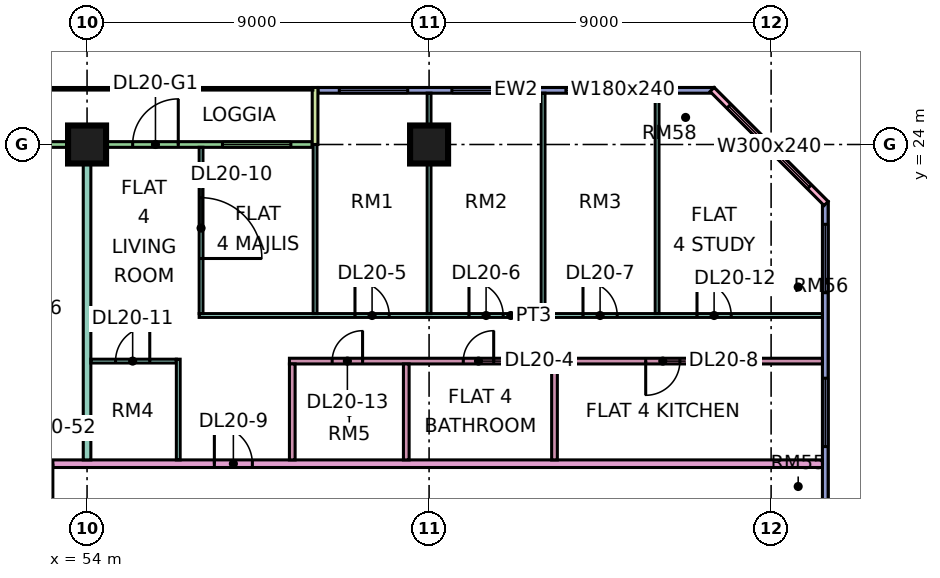
"""IFC4 building model, lengths in metres.
Left out: names, types, materials, properties, quantities, classifications, styles, units other than length and angle.
Written with IfcOpenShell. Run it as: python <this file> out.ifc"""

import sys

from ifc_helpers import new_model, si_unit, direction, frame, frame_2d, origin, origin_2d, place, context, subcontext, project, spatial, rectangle, extrude, element, fill, save


model = new_model("IFC4")
c1 = context("Model", 3, precision=1e-05, world=origin(), true_north=direction((0.0, 1.0)))
c2 = subcontext(c1, "Body", "Model", "MODEL_VIEW")
j1 = project(units=[si_unit("LENGTHUNIT", "METRE"), si_unit("PLANEANGLEUNIT", "RADIAN")], contexts=[c1])
p1 = place(None, origin())
s1 = spatial("IfcSite", under=j1, at=p1, CompositionType="ELEMENT")
p2 = place(p1, origin())
s2 = spatial("IfcBuilding", under=s1, at=p2, CompositionType="ELEMENT")
p3 = place(p2, frame((0.0, 0.0, 91.9)))
s3 = spatial("IfcBuildingStorey", under=s2, at=p3, CompositionType="ELEMENT", Elevation=91.9)
for number, where, z_axis, x_axis in (
    (1, (54.0, 24.0, 0.0), (0.0, 0.0, 1.0), (1.0, 0.0, 0.0)),
    (2, (63.0, 24.0, 0.0), (0.0, 0.0, 1.0), (1.0, 0.0, 0.0)),
):
    element("IfcColumn", number, at=place(p3, frame(where, z_axis=z_axis, x_axis=x_axis)), inside=s3, PredefinedType="COLUMN", context=c2, shape_type="SweptSolid", body=[
        extrude(rectangle(XDim=1.0, YDim=1.0, at=origin_2d()), origin(), (0.0, 0.0, 1.0), 3.75),
    ])
p4 = place(p3, frame((70.5, 25.425, 0.0), z_axis=(0.0, 0.0, 1.0), x_axis=(-1.0, 0.0, 0.0)))
e3 = element("IfcWall", 3, at=p4, inside=s3, PredefinedType="SOLIDWALL", context=c2, shape_type="SweptSolid", body=[
    extrude(rectangle(XDim=10.425, YDim=0.15, at=frame_2d((5.212, 0.0))), origin(), (0.0, 0.0, 1.0), 3.35),
])
p5 = place(p4, frame((2.1, 0.0, 0.45)))
e4 = element("IfcOpeningElement", 4, at=p5, cuts=e3, PredefinedType="OPENING", context=c2, shape_type="SweptSolid", body=[
    extrude(rectangle(XDim=1.8, YDim=2.4, at=frame_2d((0.9, 1.2))), frame((0.0, 0.085, 0.0), z_axis=(0.0, -1.0, 0.0), x_axis=(1.0, 0.0, 0.0)), (0.0, 0.0, 1.0), 0.17),
])
p6 = place(p4, frame((5.1, 0.0, 0.45)))
e5 = element("IfcOpeningElement", 5, at=p6, cuts=e3, PredefinedType="OPENING", context=c2, shape_type="SweptSolid", body=[
    extrude(rectangle(XDim=1.8, YDim=2.4, at=frame_2d((0.9, 1.2))), frame((0.0, 0.085, 0.0), z_axis=(0.0, -1.0, 0.0), x_axis=(1.0, 0.0, 0.0)), (0.0, 0.0, 1.0), 0.17),
])
p7 = place(p4, frame((8.062, 0.0, 0.45)))
e6 = element("IfcOpeningElement", 6, at=p7, cuts=e3, PredefinedType="OPENING", context=c2, shape_type="SweptSolid", body=[
    extrude(rectangle(XDim=1.8, YDim=2.4, at=frame_2d((0.9, 1.2))), frame((0.0, 0.085, 0.0), z_axis=(0.0, -1.0, 0.0), x_axis=(1.0, 0.0, 0.0)), (0.0, 0.0, 1.0), 0.17),
])
p8 = place(p3, frame((59.925, 24.0, 0.0), z_axis=(0.0, 0.0, 1.0), x_axis=(-1.0, 0.0, 0.0)))
e7 = element("IfcWall", 7, at=p8, inside=s3, PredefinedType="SOLIDWALL", context=c2, shape_type="SweptSolid", body=[
    extrude(rectangle(XDim=11.85, YDim=0.15, at=frame_2d((5.925, 0.0))), origin(), (0.0, 0.0, 1.0), 3.35),
])
p9 = place(p8, frame((0.562, 0.0, 0.45)))
e8 = element("IfcOpeningElement", 8, at=p9, cuts=e7, PredefinedType="OPENING", context=c2, shape_type="SweptSolid", body=[
    extrude(rectangle(XDim=1.8, YDim=2.4, at=frame_2d((0.9, 1.2))), frame((0.0, 0.085, 0.0), z_axis=(0.0, -1.0, 0.0), x_axis=(1.0, 0.0, 0.0)), (0.0, 0.0, 1.0), 0.17),
])
p10 = place(p8, frame((3.525, 0.0, 0.0)))
e9 = element("IfcOpeningElement", 9, at=p10, cuts=e7, PredefinedType="OPENING", context=c2, shape_type="SweptSolid", body=[
    extrude(rectangle(XDim=1.2, YDim=2.4, at=frame_2d((0.6, 1.2))), frame((0.0, 0.085, 0.0), z_axis=(0.0, -1.0, 0.0), x_axis=(1.0, 0.0, 0.0)), (0.0, 0.0, 1.0), 0.17),
])
p11 = place(p8, frame((7.087, 0.0, 0.45)))
e10 = element("IfcOpeningElement", 10, at=p11, cuts=e7, PredefinedType="OPENING", context=c2, shape_type="SweptSolid", body=[
    extrude(rectangle(XDim=4.2, YDim=2.4, at=frame_2d((2.1, 1.2))), frame((0.0, 0.085, 0.0), z_axis=(0.0, -1.0, 0.0), x_axis=(1.0, 0.0, 0.0)), (0.0, 0.0, 1.0), 0.17),
])
p12 = place(p3, frame((60.0, 25.5, 0.0), z_axis=(0.0, 0.0, 1.0), x_axis=(0.0, -1.0, 0.0)))
e11 = element("IfcWall", 11, at=p12, inside=s3, PredefinedType="SOLIDWALL", context=c2, shape_type="SweptSolid", body=[
    extrude(rectangle(XDim=1.5, YDim=0.15, at=frame_2d((0.75, 0.0))), origin(), (0.0, 0.0, 1.0), 3.35),
])
p13 = place(p3, frame((73.425, 12.075, 0.0), z_axis=(0.0, 0.0, 1.0), x_axis=(0.0, 1.0, 0.0)))
e12 = element("IfcWall", 12, at=p13, inside=s3, PredefinedType="SOLIDWALL", context=c2, shape_type="SweptSolid", body=[
    extrude(rectangle(XDim=10.425, YDim=0.15, at=frame_2d((5.212, 0.0))), origin(), (0.0, 0.0, 1.0), 3.35),
])
p14 = place(p13, frame((3.975, 0.0, 0.45)))
e13 = element("IfcOpeningElement", 13, at=p14, cuts=e12, PredefinedType="OPENING", context=c2, shape_type="SweptSolid", body=[
    extrude(rectangle(XDim=1.8, YDim=2.4, at=frame_2d((0.9, 1.2))), frame((0.0, 0.085, 0.0), z_axis=(0.0, -1.0, 0.0), x_axis=(1.0, 0.0, 0.0)), (0.0, 0.0, 1.0), 0.17),
])
p15 = place(p13, frame((8.025, 0.0, 0.45)))
e14 = element("IfcOpeningElement", 14, at=p15, cuts=e12, PredefinedType="OPENING", context=c2, shape_type="SweptSolid", body=[
    extrude(rectangle(XDim=1.8, YDim=2.4, at=frame_2d((0.9, 1.2))), frame((0.0, 0.085, 0.0), z_axis=(0.0, -1.0, 0.0), x_axis=(1.0, 0.0, 0.0)), (0.0, 0.0, 1.0), 0.17),
])
p16 = place(p3, frame((73.447, 22.447, 0.0), z_axis=(0.0, 0.0, 1.0), x_axis=(-0.707106781187, 0.707106781187, 0.0)))
e15 = element("IfcWall", 15, at=p16, inside=s3, PredefinedType="SOLIDWALL", context=c2, shape_type="SweptSolid", body=[
    extrude(rectangle(XDim=4.243, YDim=0.15, at=frame_2d((2.121, 0.0))), origin(), (0.0, 0.0, 1.0), 3.35),
])
p17 = place(p16, frame((0.621, 0.0, 0.45)))
e16 = element("IfcOpeningElement", 16, at=p17, cuts=e15, PredefinedType="OPENING", context=c2, shape_type="SweptSolid", body=[
    extrude(rectangle(XDim=3.0, YDim=2.4, at=frame_2d((1.5, 1.2))), frame((0.0, 0.085, 0.0), z_axis=(0.0, -1.0, 0.0), x_axis=(1.0, 0.0, 0.0)), (0.0, 0.0, 1.0), 0.17),
])
p18 = place(p3, frame((51.225, 15.6, 0.0), z_axis=(0.0, 0.0, 1.0), x_axis=(1.0, 0.0, 0.0)))
e17 = element("IfcWall", 17, at=p18, inside=s3, PredefinedType="PARTITIONING", context=c2, shape_type="SweptSolid", body=[
    extrude(rectangle(XDim=22.125, YDim=0.2, at=frame_2d((11.062, 0.0))), origin(), (0.0, 0.0, 1.0), 3.35),
])
p19 = place(p18, frame((6.125, 0.0, 0.0)))
e18 = element("IfcOpeningElement", 18, at=p19, cuts=e17, PredefinedType="OPENING", context=c2, shape_type="SweptSolid", body=[
    extrude(rectangle(XDim=1.0, YDim=2.1, at=frame_2d((0.5, 1.05))), frame((0.0, 0.11, 0.0), z_axis=(0.0, -1.0, 0.0), x_axis=(1.0, 0.0, 0.0)), (0.0, 0.0, 1.0), 0.22),
])
p20 = place(p18, frame((0.875, 0.0, 0.0)))
e19 = element("IfcOpeningElement", 19, at=p20, cuts=e17, PredefinedType="OPENING", context=c2, shape_type="SweptSolid", body=[
    extrude(rectangle(XDim=1.0, YDim=2.1, at=frame_2d((0.5, 1.05))), frame((0.0, 0.11, 0.0), z_axis=(0.0, -1.0, 0.0), x_axis=(1.0, 0.0, 0.0)), (0.0, 0.0, 1.0), 0.22),
])
p21 = place(p3, frame((54.0, 15.7, 0.0), z_axis=(0.0, 0.0, 1.0), x_axis=(0.0, 1.0, 0.0)))
e20 = element("IfcWall", 20, at=p21, inside=s3, PredefinedType="PARTITIONING", context=c2, shape_type="SweptSolid", body=[
    extrude(rectangle(XDim=8.226, YDim=0.2, at=frame_2d((4.113, 0.0))), origin(), (0.0, 0.0, 1.0), 3.35),
])
p22 = place(p3, frame((54.1, 18.3, 0.0), z_axis=(0.0, 0.0, 1.0), x_axis=(1.0, 0.0, 0.0)))
e21 = element("IfcWall", 21, at=p22, inside=s3, PredefinedType="PARTITIONING", context=c2, shape_type="SweptSolid", body=[
    extrude(rectangle(XDim=2.25, YDim=0.1, at=frame_2d((1.125, 0.0))), origin(), (0.0, 0.0, 1.0), 3.35),
])
p23 = place(p22, frame((0.65, 0.0, 0.0)))
e22 = element("IfcOpeningElement", 22, at=p23, cuts=e21, PredefinedType="OPENING", context=c2, shape_type="SweptSolid", body=[
    extrude(rectangle(XDim=0.9, YDim=2.1, at=frame_2d((0.45, 1.05))), frame((0.0, 0.06, 0.0), z_axis=(0.0, -1.0, 0.0), x_axis=(1.0, 0.0, 0.0)), (0.0, 0.0, 1.0), 0.12),
])
p24 = place(p3, frame((56.4, 15.7, 0.0), z_axis=(0.0, 0.0, 1.0), x_axis=(0.0, 1.0, 0.0)))
e23 = element("IfcWall", 23, at=p24, inside=s3, PredefinedType="PARTITIONING", context=c2, shape_type="SweptSolid", body=[
    extrude(rectangle(XDim=2.65, YDim=0.1, at=frame_2d((1.325, 0.0))), origin(), (0.0, 0.0, 1.0), 3.35),
])
p25 = place(p3, frame((56.95, 19.5, 0.0), z_axis=(0.0, 0.0, 1.0), x_axis=(1.0, 0.0, 0.0)))
e24 = element("IfcWall", 24, at=p25, inside=s3, PredefinedType="PARTITIONING", context=c2, shape_type="SweptSolid", body=[
    extrude(rectangle(XDim=16.4, YDim=0.1, at=frame_2d((8.2, 0.0))), origin(), (0.0, 0.0, 1.0), 3.35),
])
p26 = place(p25, frame((4.1, 0.0, 0.0)))
e25 = element("IfcOpeningElement", 25, at=p26, cuts=e24, PredefinedType="OPENING", context=c2, shape_type="SweptSolid", body=[
    extrude(rectangle(XDim=0.9, YDim=2.1, at=frame_2d((0.45, 1.05))), frame((0.0, 0.06, 0.0), z_axis=(0.0, -1.0, 0.0), x_axis=(1.0, 0.0, 0.0)), (0.0, 0.0, 1.0), 0.12),
])
p27 = place(p25, frame((7.1, 0.0, 0.0)))
e26 = element("IfcOpeningElement", 26, at=p27, cuts=e24, PredefinedType="OPENING", context=c2, shape_type="SweptSolid", body=[
    extrude(rectangle(XDim=0.9, YDim=2.1, at=frame_2d((0.45, 1.05))), frame((0.0, 0.06, 0.0), z_axis=(0.0, -1.0, 0.0), x_axis=(1.0, 0.0, 0.0)), (0.0, 0.0, 1.0), 0.12),
])
p28 = place(p25, frame((10.1, 0.0, 0.0)))
e27 = element("IfcOpeningElement", 27, at=p28, cuts=e24, PredefinedType="OPENING", context=c2, shape_type="SweptSolid", body=[
    extrude(rectangle(XDim=0.9, YDim=2.1, at=frame_2d((0.45, 1.05))), frame((0.0, 0.06, 0.0), z_axis=(0.0, -1.0, 0.0), x_axis=(1.0, 0.0, 0.0)), (0.0, 0.0, 1.0), 0.12),
])
p29 = place(p25, frame((13.1, 0.0, 0.0)))
e28 = element("IfcOpeningElement", 28, at=p29, cuts=e24, PredefinedType="OPENING", context=c2, shape_type="SweptSolid", body=[
    extrude(rectangle(XDim=0.9, YDim=2.1, at=frame_2d((0.45, 1.05))), frame((0.0, 0.06, 0.0), z_axis=(0.0, -1.0, 0.0), x_axis=(1.0, 0.0, 0.0)), (0.0, 0.0, 1.0), 0.12),
])
p30 = place(p3, frame((57.0, 19.55, 0.0), z_axis=(0.0, 0.0, 1.0), x_axis=(0.0, 1.0, 0.0)))
e29 = element("IfcWall", 29, at=p30, inside=s3, PredefinedType="PARTITIONING", context=c2, shape_type="SweptSolid", body=[
    extrude(rectangle(XDim=4.376, YDim=0.1, at=frame_2d((2.188, 0.0))), origin(), (0.0, 0.0, 1.0), 3.35),
])
p31 = place(p30, frame((1.45, 0.0, 0.0)))
e30 = element("IfcOpeningElement", 30, at=p31, cuts=e29, PredefinedType="OPENING", context=c2, shape_type="SweptSolid", body=[
    extrude(rectangle(XDim=1.6, YDim=2.1, at=frame_2d((0.8, 1.05))), frame((0.0, 0.06, 0.0), z_axis=(0.0, -1.0, 0.0), x_axis=(1.0, 0.0, 0.0)), (0.0, 0.0, 1.0), 0.12),
])
p32 = place(p3, frame((59.325, 18.3, 0.0), z_axis=(0.0, 0.0, 1.0), x_axis=(1.0, 0.0, 0.0)))
e31 = element("IfcWall", 31, at=p32, inside=s3, PredefinedType="PARTITIONING", context=c2, shape_type="SweptSolid", body=[
    extrude(rectangle(XDim=14.025, YDim=0.15, at=frame_2d((7.013, 0.0))), origin(), (0.0, 0.0, 1.0), 3.35),
])
p33 = place(p32, frame((4.575, 0.0, 0.0)))
e32 = element("IfcOpeningElement", 32, at=p33, cuts=e31, PredefinedType="OPENING", context=c2, shape_type="SweptSolid", body=[
    extrude(rectangle(XDim=0.8, YDim=2.1, at=frame_2d((0.4, 1.05))), frame((0.0, 0.085, 0.0), z_axis=(0.0, -1.0, 0.0), x_axis=(1.0, 0.0, 0.0)), (0.0, 0.0, 1.0), 0.17),
])
p34 = place(p32, frame((9.375, 0.0, 0.0)))
e33 = element("IfcOpeningElement", 33, at=p34, cuts=e31, PredefinedType="OPENING", context=c2, shape_type="SweptSolid", body=[
    extrude(rectangle(XDim=0.9, YDim=2.1, at=frame_2d((0.45, 1.05))), frame((0.0, 0.085, 0.0), z_axis=(0.0, -1.0, 0.0), x_axis=(1.0, 0.0, 0.0)), (0.0, 0.0, 1.0), 0.17),
])
p35 = place(p32, frame((1.125, 0.0, 0.0)))
e34 = element("IfcOpeningElement", 34, at=p35, cuts=e31, PredefinedType="OPENING", context=c2, shape_type="SweptSolid", body=[
    extrude(rectangle(XDim=0.8, YDim=2.1, at=frame_2d((0.4, 1.05))), frame((0.0, 0.085, 0.0), z_axis=(0.0, -1.0, 0.0), x_axis=(1.0, 0.0, 0.0)), (0.0, 0.0, 1.0), 0.17),
])
p36 = place(p3, frame((59.4, 15.7, 0.0), z_axis=(0.0, 0.0, 1.0), x_axis=(0.0, 1.0, 0.0)))
e35 = element("IfcWall", 35, at=p36, inside=s3, PredefinedType="PARTITIONING", context=c2, shape_type="SweptSolid", body=[
    extrude(rectangle(XDim=2.525, YDim=0.15, at=frame_2d((1.263, 0.0))), origin(), (0.0, 0.0, 1.0), 3.35),
])
p37 = place(p3, frame((60.0, 19.55, 0.0), z_axis=(0.0, 0.0, 1.0), x_axis=(0.0, 1.0, 0.0)))
e36 = element("IfcWall", 36, at=p37, inside=s3, PredefinedType="PARTITIONING", context=c2, shape_type="SweptSolid", body=[
    extrude(rectangle(XDim=4.45, YDim=0.1, at=frame_2d((2.225, 0.0))), origin(), (0.0, 0.0, 1.0), 3.35),
])
p38 = place(p3, frame((62.4, 15.7, 0.0), z_axis=(0.0, 0.0, 1.0), x_axis=(0.0, 1.0, 0.0)))
e37 = element("IfcWall", 37, at=p38, inside=s3, PredefinedType="PARTITIONING", context=c2, shape_type="SweptSolid", body=[
    extrude(rectangle(XDim=2.525, YDim=0.15, at=frame_2d((1.263, 0.0))), origin(), (0.0, 0.0, 1.0), 3.35),
])
for number, where, z_axis, x_axis in (
    (38, (63.0, 19.55, 0.0), (0.0, 0.0, 1.0), (0.0, 1.0, 0.0)),
    (39, (66.0, 19.55, 0.0), (0.0, 0.0, 1.0), (0.0, 1.0, 0.0)),
):
    element("IfcWall", number, at=place(p3, frame(where, z_axis=z_axis, x_axis=x_axis)), inside=s3, PredefinedType="PARTITIONING", context=c2, shape_type="SweptSolid", body=[
        extrude(rectangle(XDim=5.801, YDim=0.1, at=frame_2d((2.9, 0.0))), origin(), (0.0, 0.0, 1.0), 3.35),
    ])
p39 = place(p3, frame((66.3, 15.7, 0.0), z_axis=(0.0, 0.0, 1.0), x_axis=(0.0, 1.0, 0.0)))
e40 = element("IfcWall", 40, at=p39, inside=s3, PredefinedType="PARTITIONING", context=c2, shape_type="SweptSolid", body=[
    extrude(rectangle(XDim=2.525, YDim=0.15, at=frame_2d((1.263, 0.0))), origin(), (0.0, 0.0, 1.0), 3.35),
])
p40 = place(p3, frame((69.0, 19.55, 0.0), z_axis=(0.0, 0.0, 1.0), x_axis=(0.0, 1.0, 0.0)))
e41 = element("IfcWall", 41, at=p40, inside=s3, PredefinedType="PARTITIONING", context=c2, shape_type="SweptSolid", body=[
    extrude(rectangle(XDim=5.8, YDim=0.1, at=frame_2d((2.9, 0.0))), origin(), (0.0, 0.0, 1.0), 3.35),
])
p41 = place(p5, origin())
e42 = element("IfcWindow", 42, at=p41, inside=s3, PartitioningType="SINGLE_PANEL", PredefinedType="WINDOW", context=c2, shape_type="SweptSolid", body=[
    extrude(rectangle(XDim=1.8, YDim=2.4, at=frame_2d((0.9, 1.2))), frame((0.0, 0.03, 0.0), z_axis=(0.0, -1.0, 0.0), x_axis=(1.0, 0.0, 0.0)), (0.0, 0.0, 1.0), 0.06),
])
fill(e4, e42)
p42 = place(p6, origin())
e43 = element("IfcWindow", 43, at=p42, inside=s3, PartitioningType="SINGLE_PANEL", PredefinedType="WINDOW", context=c2, shape_type="SweptSolid", body=[
    extrude(rectangle(XDim=1.8, YDim=2.4, at=frame_2d((0.9, 1.2))), frame((0.0, 0.03, 0.0), z_axis=(0.0, -1.0, 0.0), x_axis=(1.0, 0.0, 0.0)), (0.0, 0.0, 1.0), 0.06),
])
fill(e5, e43)
p43 = place(p7, origin())
e44 = element("IfcWindow", 44, at=p43, inside=s3, PartitioningType="SINGLE_PANEL", PredefinedType="WINDOW", context=c2, shape_type="SweptSolid", body=[
    extrude(rectangle(XDim=1.8, YDim=2.4, at=frame_2d((0.9, 1.2))), frame((0.0, 0.03, 0.0), z_axis=(0.0, -1.0, 0.0), x_axis=(1.0, 0.0, 0.0)), (0.0, 0.0, 1.0), 0.06),
])
fill(e6, e44)
p44 = place(p9, origin())
e45 = element("IfcWindow", 45, at=p44, inside=s3, PartitioningType="SINGLE_PANEL", PredefinedType="WINDOW", context=c2, shape_type="SweptSolid", body=[
    extrude(rectangle(XDim=1.8, YDim=2.4, at=frame_2d((0.9, 1.2))), frame((0.0, 0.03, 0.0), z_axis=(0.0, -1.0, 0.0), x_axis=(1.0, 0.0, 0.0)), (0.0, 0.0, 1.0), 0.06),
])
fill(e8, e45)
p45 = place(p10, frame((1.2, 0.0, 0.0), z_axis=(0.0, 0.0, 1.0), x_axis=(-1.0, 0.0, 0.0)))
e46 = element("IfcDoor", 46, at=p45, inside=s3, OperationType="DOUBLE_DOOR_SINGLE_SWING", PredefinedType="DOOR", context=c2, shape_type="SweptSolid", body=[
    extrude(rectangle(XDim=1.2, YDim=2.4, at=frame_2d((0.6, 1.2))), frame((0.0, 0.025, 0.0), z_axis=(0.0, -1.0, 0.0), x_axis=(1.0, 0.0, 0.0)), (0.0, 0.0, 1.0), 0.05),
])
fill(e9, e46)
p46 = place(p14, origin())
e47 = element("IfcWindow", 47, at=p46, inside=s3, PartitioningType="SINGLE_PANEL", PredefinedType="WINDOW", context=c2, shape_type="SweptSolid", body=[
    extrude(rectangle(XDim=1.8, YDim=2.4, at=frame_2d((0.9, 1.2))), frame((0.0, 0.03, 0.0), z_axis=(0.0, -1.0, 0.0), x_axis=(1.0, 0.0, 0.0)), (0.0, 0.0, 1.0), 0.06),
])
fill(e13, e47)
p47 = place(p15, origin())
e48 = element("IfcWindow", 48, at=p47, inside=s3, PartitioningType="SINGLE_PANEL", PredefinedType="WINDOW", context=c2, shape_type="SweptSolid", body=[
    extrude(rectangle(XDim=1.8, YDim=2.4, at=frame_2d((0.9, 1.2))), frame((0.0, 0.03, 0.0), z_axis=(0.0, -1.0, 0.0), x_axis=(1.0, 0.0, 0.0)), (0.0, 0.0, 1.0), 0.06),
])
fill(e14, e48)
p48 = place(p17, origin())
e49 = element("IfcWindow", 49, at=p48, inside=s3, PartitioningType="SINGLE_PANEL", PredefinedType="WINDOW", context=c2, shape_type="SweptSolid", body=[
    extrude(rectangle(XDim=3.0, YDim=2.4, at=frame_2d((1.5, 1.2))), frame((0.0, 0.03, 0.0), z_axis=(0.0, -1.0, 0.0), x_axis=(1.0, 0.0, 0.0)), (0.0, 0.0, 1.0), 0.06),
])
fill(e16, e49)
p49 = place(p33, frame((0.8, 0.0, 0.0), z_axis=(0.0, 0.0, 1.0), x_axis=(-1.0, 0.0, 0.0)))
e50 = element("IfcDoor", 50, at=p49, inside=s3, OperationType="SINGLE_SWING_RIGHT", PredefinedType="DOOR", context=c2, shape_type="SweptSolid", body=[
    extrude(rectangle(XDim=0.8, YDim=2.1, at=frame_2d((0.4, 1.05))), frame((0.0, 0.025, 0.0), z_axis=(0.0, -1.0, 0.0), x_axis=(1.0, 0.0, 0.0)), (0.0, 0.0, 1.0), 0.05),
])
fill(e32, e50)
p50 = place(p26, origin())
e51 = element("IfcDoor", 51, at=p50, inside=s3, OperationType="SINGLE_SWING_LEFT", PredefinedType="DOOR", context=c2, shape_type="SweptSolid", body=[
    extrude(rectangle(XDim=0.9, YDim=2.1, at=frame_2d((0.45, 1.05))), frame((0.0, 0.025, 0.0), z_axis=(0.0, -1.0, 0.0), x_axis=(1.0, 0.0, 0.0)), (0.0, 0.0, 1.0), 0.05),
])
fill(e25, e51)
p51 = place(p27, origin())
e52 = element("IfcDoor", 52, at=p51, inside=s3, OperationType="SINGLE_SWING_LEFT", PredefinedType="DOOR", context=c2, shape_type="SweptSolid", body=[
    extrude(rectangle(XDim=0.9, YDim=2.1, at=frame_2d((0.45, 1.05))), frame((0.0, 0.025, 0.0), z_axis=(0.0, -1.0, 0.0), x_axis=(1.0, 0.0, 0.0)), (0.0, 0.0, 1.0), 0.05),
])
fill(e26, e52)
p52 = place(p28, origin())
e53 = element("IfcDoor", 53, at=p52, inside=s3, OperationType="SINGLE_SWING_LEFT", PredefinedType="DOOR", context=c2, shape_type="SweptSolid", body=[
    extrude(rectangle(XDim=0.9, YDim=2.1, at=frame_2d((0.45, 1.05))), frame((0.0, 0.025, 0.0), z_axis=(0.0, -1.0, 0.0), x_axis=(1.0, 0.0, 0.0)), (0.0, 0.0, 1.0), 0.05),
])
fill(e27, e53)
p53 = place(p34, frame((0.9, 0.0, 0.0), z_axis=(0.0, 0.0, 1.0), x_axis=(-1.0, 0.0, 0.0)))
e54 = element("IfcDoor", 54, at=p53, inside=s3, OperationType="SINGLE_SWING_LEFT", PredefinedType="DOOR", context=c2, shape_type="SweptSolid", body=[
    extrude(rectangle(XDim=0.9, YDim=2.1, at=frame_2d((0.45, 1.05))), frame((0.0, 0.025, 0.0), z_axis=(0.0, -1.0, 0.0), x_axis=(1.0, 0.0, 0.0)), (0.0, 0.0, 1.0), 0.05),
])
fill(e33, e54)
p54 = place(p19, origin())
e55 = element("IfcDoor", 55, at=p54, inside=s3, OperationType="SINGLE_SWING_LEFT", PredefinedType="DOOR", context=c2, shape_type="SweptSolid", body=[
    extrude(rectangle(XDim=1.0, YDim=2.1, at=frame_2d((0.5, 1.05))), frame((0.0, 0.025, 0.0), z_axis=(0.0, -1.0, 0.0), x_axis=(1.0, 0.0, 0.0)), (0.0, 0.0, 1.0), 0.05),
])
fill(e18, e55)
p55 = place(p31, frame((1.6, 0.0, 0.0), z_axis=(0.0, 0.0, 1.0), x_axis=(-1.0, 0.0, 0.0)))
e56 = element("IfcDoor", 56, at=p55, inside=s3, OperationType="DOUBLE_DOOR_SINGLE_SWING", PredefinedType="DOOR", context=c2, shape_type="SweptSolid", body=[
    extrude(rectangle(XDim=1.6, YDim=2.1, at=frame_2d((0.8, 1.05))), frame((0.0, 0.025, 0.0), z_axis=(0.0, -1.0, 0.0), x_axis=(1.0, 0.0, 0.0)), (0.0, 0.0, 1.0), 0.05),
])
fill(e30, e56)
p56 = place(p23, frame((0.9, 0.0, 0.0), z_axis=(0.0, 0.0, 1.0), x_axis=(-1.0, 0.0, 0.0)))
e57 = element("IfcDoor", 57, at=p56, inside=s3, OperationType="SINGLE_SWING_RIGHT", PredefinedType="DOOR", context=c2, shape_type="SweptSolid", body=[
    extrude(rectangle(XDim=0.9, YDim=2.1, at=frame_2d((0.45, 1.05))), frame((0.0, 0.025, 0.0), z_axis=(0.0, -1.0, 0.0), x_axis=(1.0, 0.0, 0.0)), (0.0, 0.0, 1.0), 0.05),
])
fill(e22, e57)
p57 = place(p29, origin())
e58 = element("IfcDoor", 58, at=p57, inside=s3, OperationType="SINGLE_SWING_LEFT", PredefinedType="DOOR", context=c2, shape_type="SweptSolid", body=[
    extrude(rectangle(XDim=0.9, YDim=2.1, at=frame_2d((0.45, 1.05))), frame((0.0, 0.025, 0.0), z_axis=(0.0, -1.0, 0.0), x_axis=(1.0, 0.0, 0.0)), (0.0, 0.0, 1.0), 0.05),
])
fill(e28, e58)
p58 = place(p35, frame((0.8, 0.0, 0.0), z_axis=(0.0, 0.0, 1.0), x_axis=(-1.0, 0.0, 0.0)))
e59 = element("IfcDoor", 59, at=p58, inside=s3, OperationType="SINGLE_SWING_RIGHT", PredefinedType="DOOR", context=c2, shape_type="SweptSolid", body=[
    extrude(rectangle(XDim=0.8, YDim=2.1, at=frame_2d((0.4, 1.05))), frame((0.0, 0.025, 0.0), z_axis=(0.0, -1.0, 0.0), x_axis=(1.0, 0.0, 0.0)), (0.0, 0.0, 1.0), 0.05),
])
fill(e34, e59)
p59 = place(p20, origin())
e60 = element("IfcDoor", 60, at=p59, inside=s3, OperationType="SINGLE_SWING_RIGHT", PredefinedType="DOOR", context=c2, shape_type="SweptSolid", body=[
    extrude(rectangle(XDim=1.0, YDim=2.1, at=frame_2d((0.5, 1.05))), frame((0.0, 0.025, 0.0), z_axis=(0.0, -1.0, 0.0), x_axis=(1.0, 0.0, 0.0)), (0.0, 0.0, 1.0), 0.05),
])
fill(e19, e60)
save(model, sys.argv[1])
